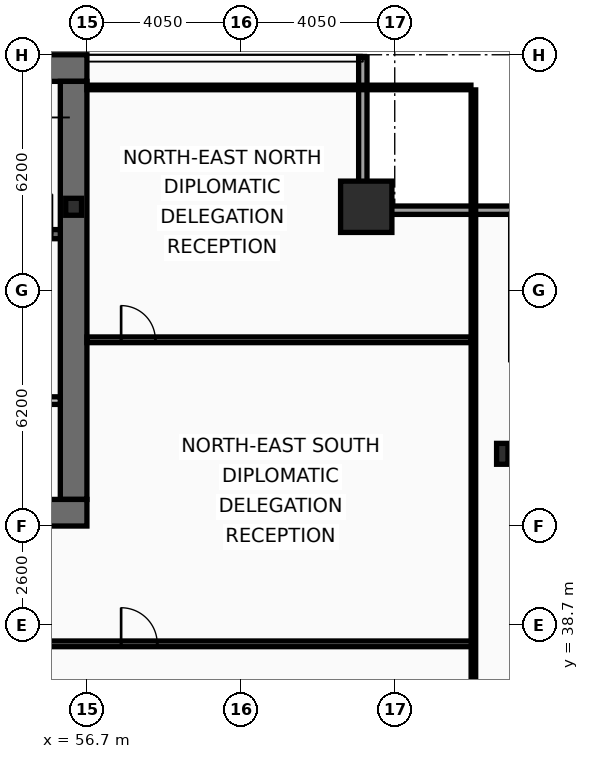
"""IFC4 building model, lengths in metres.
Left out: names, types, materials, properties, quantities, classifications, styles, units other than length and angle.
Written with IfcOpenShell. Run it as: python <this file> out.ifc"""

import sys

from ifc_helpers import new_model, si_unit, direction, frame, frame_2d, origin, origin_2d, place, context, subcontext, project, spatial, rectangle, hollow_rectangle, i_section, extrude, element, fill, save


model = new_model("IFC4")
c1 = context("Model", 3, precision=1e-05, world=origin(), true_north=direction((0.0, 1.0)))
c2 = subcontext(c1, "Body", "Model", "MODEL_VIEW")
j1 = project(units=[si_unit("LENGTHUNIT", "METRE"), si_unit("PLANEANGLEUNIT", "RADIAN")], contexts=[c1])
p1 = place(None, origin())
s1 = spatial("IfcSite", under=j1, at=p1, CompositionType="ELEMENT")
p2 = place(p1, origin())
s2 = spatial("IfcBuilding", under=s1, at=p2, CompositionType="ELEMENT")
p3 = place(p2, frame((0.0, 0.0, 143.4)))
s3 = spatial("IfcBuildingStorey", under=s2, at=p3, CompositionType="ELEMENT", Elevation=143.4)
p4 = place(p3, frame((16.2, 53.35, 0.0), z_axis=(0.0, 0.0, 1.0), x_axis=(1.0, 0.0, 0.0)))
e1 = element("IfcWall", 1, at=p4, inside=s3, PredefinedType="SHEAR", context=c2, shape_type="SweptSolid", body=[
    extrude(rectangle(XDim=40.5, YDim=0.7, at=frame_2d((20.25, 0.0))), origin(), (0.0, 0.0, 1.0), 3.44),
])
p5 = place(p3, frame((56.35, 53.0, 0.0), z_axis=(0.0, 0.0, 1.0), x_axis=(0.0, -1.0, 0.0)))
e2 = element("IfcWall", 2, at=p5, inside=s3, PredefinedType="SHEAR", context=c2, shape_type="SweptSolid", body=[
    extrude(rectangle(XDim=11.0, YDim=0.7, at=frame_2d((5.5, 0.0))), origin(), (0.0, 0.0, 1.0), 3.44),
])
p6 = place(p3, frame((56.7, 41.65, 0.0), z_axis=(0.0, 0.0, 1.0), x_axis=(-1.0, 0.0, 0.0)))
e3 = element("IfcWall", 3, at=p6, inside=s3, PredefinedType="SHEAR", context=c2, shape_type="SweptSolid", body=[
    extrude(rectangle(XDim=2.45, YDim=0.7, at=frame_2d((1.225, 0.0))), origin(), (0.0, 0.0, 1.0), 3.44),
])
p7 = place(p3, frame((48.63, 48.98, 0.0), z_axis=(0.0, 0.0, 1.0), x_axis=(1.0, 0.0, 0.0)))
e4 = element("IfcWall", 4, at=p7, inside=s3, PredefinedType="SHEAR", context=c2, shape_type="SweptSolid", body=[
    extrude(rectangle(XDim=7.37, YDim=0.24, at=frame_2d((3.685, 0.0))), origin(), (0.0, 0.0, 1.0), 3.44),
])
p8 = place(p7, frame((6.1, 0.0, 0.0)))
e5 = element("IfcOpeningElement", 5, at=p8, cuts=e4, PredefinedType="OPENING", context=c2, shape_type="SweptSolid", body=[
    extrude(rectangle(XDim=1.05, YDim=2.15, at=frame_2d((0.525, 1.075))), frame((0.0, 0.13, 0.0), z_axis=(0.0, -1.0, 0.0), x_axis=(1.0, 0.0, 0.0)), (0.0, 0.0, 1.0), 0.26),
])
p9 = place(p3, frame((64.05, 49.7, 0.0), z_axis=(0.0, 0.0, 1.0), x_axis=(1.0, 0.0, 0.0)))
e6 = element("IfcColumn", 6, at=p9, inside=s3, PredefinedType="COLUMN", context=c2, shape_type="SweptSolid", body=[
    extrude(hollow_rectangle(XDim=1.35, YDim=1.35, WallThickness=0.065, at=origin_2d()), origin(), (0.0, 0.0, 1.0), 3.6),
])
p10 = place(p3, frame((67.63, 43.2, 0.0), z_axis=(0.0, 0.0, 1.0), x_axis=(1.0, 0.0, 0.0)))
e7 = element("IfcColumn", 7, at=p10, inside=s3, PredefinedType="COLUMN", context=c2, shape_type="SweptSolid", body=[
    extrude(i_section(OverallWidth=0.3, OverallDepth=0.55, WebThickness=0.015, FlangeThickness=0.029, at=origin_2d()), origin(), (0.0, 0.0, 1.0), 3.6),
])
p11 = place(p3, frame((56.35, 49.7, 0.0), z_axis=(0.0, 0.0, 1.0), x_axis=(1.0, 0.0, 0.0)))
e8 = element("IfcColumn", 8, at=p11, inside=s3, PredefinedType="COLUMN", context=c2, shape_type="SweptSolid", body=[
    extrude(i_section(OverallWidth=0.416, OverallDepth=0.446, WebThickness=0.039, FlangeThickness=0.063, at=origin_2d()), origin(), (0.0, 0.0, 1.0), 3.6),
])
p12 = place(p3, frame((63.96, 53.63, 0.0), z_axis=(0.0, 0.0, 1.0), x_axis=(0.0, -1.0, 0.0)))
e9 = element("IfcWall", 9, at=p12, inside=s3, PredefinedType="SOLIDWALL", context=c2, shape_type="SweptSolid", body=[
    extrude(rectangle(XDim=3.91, YDim=0.22, at=frame_2d((1.955, 0.0))), origin(), (0.0, 0.0, 1.0), 2.83),
])
p13 = place(p3, frame((63.85, 49.61, 0.0), z_axis=(0.0, 0.0, 1.0), x_axis=(1.0, 0.0, 0.0)))
e10 = element("IfcWall", 10, at=p13, inside=s3, PredefinedType="SOLIDWALL", context=c2, shape_type="SweptSolid", body=[
    extrude(rectangle(XDim=4.22, YDim=0.22, at=frame_2d((2.11, 0.0))), origin(), (0.0, 0.0, 1.0), 2.83),
])
p14 = place(p3, frame((51.9, 44.6, 0.0), z_axis=(0.0, 0.0, 1.0), x_axis=(1.0, 0.0, 0.0)))
e11 = element("IfcWall", 11, at=p14, inside=s3, PredefinedType="PARTITIONING", context=c2, shape_type="SweptSolid", body=[
    extrude(rectangle(XDim=4.1, YDim=0.2, at=frame_2d((2.05, 0.0))), origin(), (0.0, 0.0, 1.0), 3.44),
])
p15 = place(p14, frame((1.15, 0.0, 0.0)))
e12 = element("IfcOpeningElement", 12, at=p15, cuts=e11, PredefinedType="OPENING", context=c2, shape_type="SweptSolid", body=[
    extrude(rectangle(XDim=1.05, YDim=2.15, at=frame_2d((0.525, 1.075))), frame((0.0, 0.11, 0.0), z_axis=(0.0, -1.0, 0.0), x_axis=(1.0, 0.0, 0.0)), (0.0, 0.0, 1.0), 0.22),
])
p16 = place(p3, frame((54.35, 38.2, 0.0), z_axis=(0.0, 0.0, 1.0), x_axis=(1.0, 0.0, 0.0)))
e13 = element("IfcWall", 13, at=p16, inside=s3, PredefinedType="PARTITIONING", context=c2, shape_type="SweptSolid", body=[
    extrude(rectangle(XDim=12.52, YDim=0.15, at=frame_2d((6.26, 0.0))), origin(), (0.0, 0.0, 1.0), 2.73),
])
p17 = place(p16, frame((3.25, 0.0, 0.0)))
e14 = element("IfcOpeningElement", 14, at=p17, cuts=e13, PredefinedType="OPENING", context=c2, shape_type="SweptSolid", body=[
    extrude(rectangle(XDim=0.95, YDim=2.05, at=frame_2d((0.475, 1.025))), frame((0.0, 0.085, 0.0), z_axis=(0.0, -1.0, 0.0), x_axis=(1.0, 0.0, 0.0)), (0.0, 0.0, 1.0), 0.17),
])
p18 = place(p3, frame((56.7, 46.2, 0.0), z_axis=(0.0, 0.0, 1.0), x_axis=(1.0, 0.0, 0.0)))
e15 = element("IfcWall", 15, at=p18, inside=s3, PredefinedType="PARTITIONING", context=c2, shape_type="SweptSolid", body=[
    extrude(rectangle(XDim=10.105, YDim=0.15, at=frame_2d((5.052, 0.0))), origin(), (0.0, 0.0, 1.0), 2.83),
])
p19 = place(p18, frame((0.9, 0.0, 0.0)))
e16 = element("IfcOpeningElement", 16, at=p19, cuts=e15, PredefinedType="OPENING", context=c2, shape_type="SweptSolid", body=[
    extrude(rectangle(XDim=0.9, YDim=2.05, at=frame_2d((0.45, 1.025))), frame((0.0, 0.085, 0.0), z_axis=(0.0, -1.0, 0.0), x_axis=(1.0, 0.0, 0.0)), (0.0, 0.0, 1.0), 0.17),
])
p20 = place(p3, frame((66.87, 10.665, 0.0), z_axis=(0.0, 0.0, 1.0), x_axis=(0.0, 1.0, 0.0)))
e17 = element("IfcWall", 17, at=p20, inside=s3, PredefinedType="PARTITIONING", context=c2, shape_type="SweptSolid", body=[
    extrude(rectangle(XDim=42.11, YDim=0.12, at=frame_2d((21.055, 0.0))), origin(), (0.0, 0.0, 1.0), 2.73),
])
p21 = place(p3, frame((56.7, 52.84, 0.0), z_axis=(0.0, 0.0, 1.0), x_axis=(1.0, 0.0, 0.0)))
e18 = element("IfcWall", 18, at=p21, inside=s3, PredefinedType="PARTITIONING", context=c2, shape_type="SweptSolid", body=[
    extrude(rectangle(XDim=10.105, YDim=0.12, at=frame_2d((5.052, 0.0))), origin(), (0.0, 0.0, 1.0), 3.44),
])
p22 = place(p17, origin())
e19 = element("IfcDoor", 19, at=p22, inside=s3, OperationType="SINGLE_SWING_LEFT", PredefinedType="DOOR", context=c2, shape_type="SweptSolid", body=[
    extrude(rectangle(XDim=0.95, YDim=2.05, at=frame_2d((0.475, 1.025))), frame((0.0, 0.025, 0.0), z_axis=(0.0, -1.0, 0.0), x_axis=(1.0, 0.0, 0.0)), (0.0, 0.0, 1.0), 0.05),
])
fill(e14, e19)
p23 = place(p19, origin())
e20 = element("IfcDoor", 20, at=p23, inside=s3, OperationType="SINGLE_SWING_LEFT", PredefinedType="DOOR", context=c2, shape_type="SweptSolid", body=[
    extrude(rectangle(XDim=0.9, YDim=2.05, at=frame_2d((0.45, 1.025))), frame((0.0, 0.025, 0.0), z_axis=(0.0, -1.0, 0.0), x_axis=(1.0, 0.0, 0.0)), (0.0, 0.0, 1.0), 0.05),
])
fill(e16, e20)
save(model, sys.argv[1])
